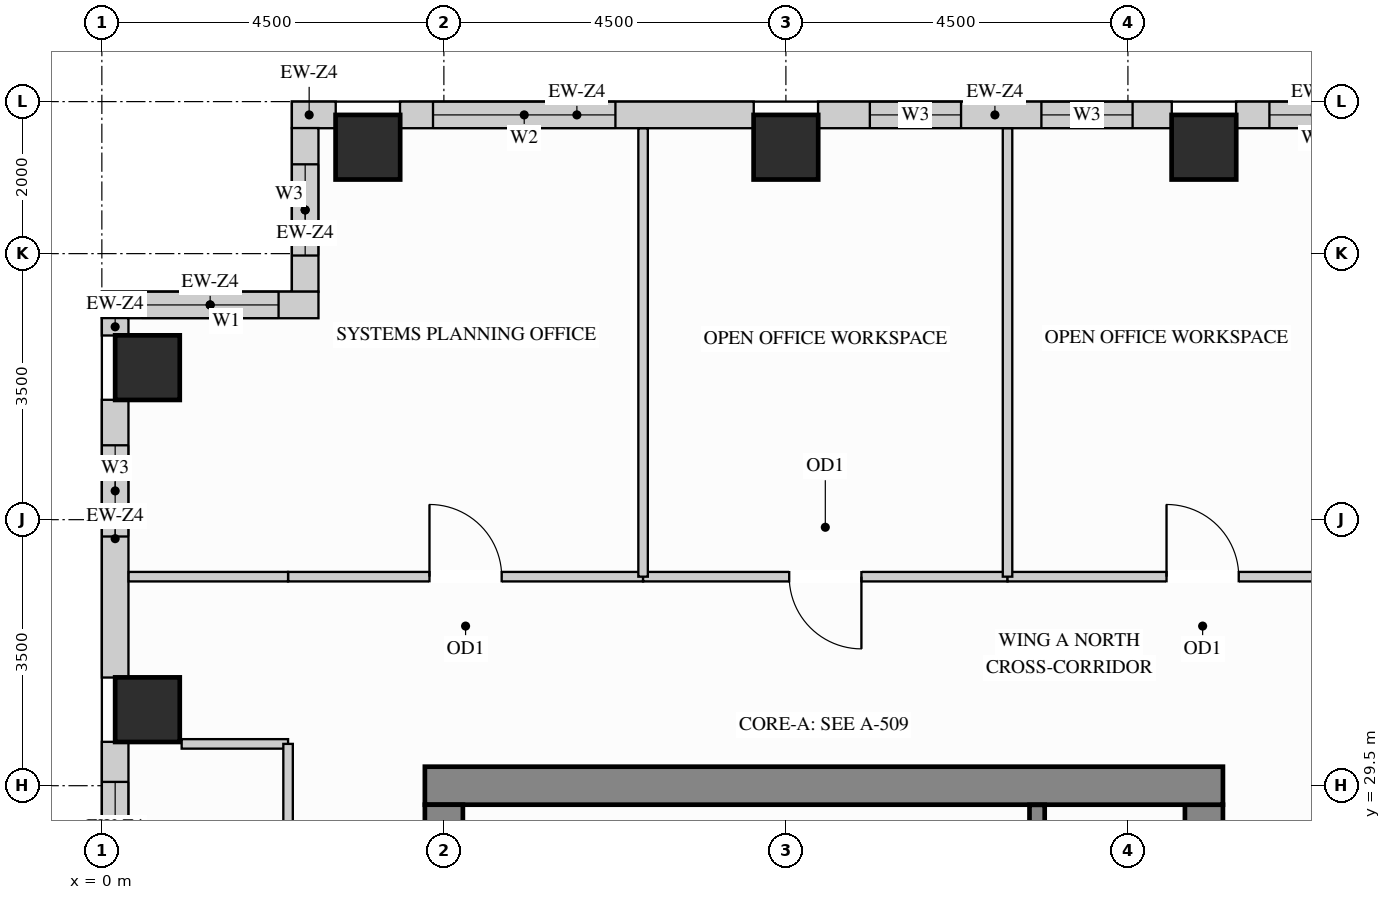
"""IFC4 building model, lengths in metres.
Left out: names, types, materials, properties, quantities, classifications, styles, units other than length and angle.
Written with IfcOpenShell. Run it as: python <this file> out.ifc"""

import sys

from ifc_helpers import new_model, si_unit, direction, frame, frame_2d, origin, origin_2d, place, context, subcontext, project, spatial, rectangle, extrude, source, transform, mapped, element, fill, save


model = new_model("IFC4")
c1 = context("Model", 3, precision=1e-05, world=origin(), true_north=direction((0.0, 1.0)))
c2 = subcontext(c1, "Body", "Model", "MODEL_VIEW")
j1 = project(units=[si_unit("LENGTHUNIT", "METRE"), si_unit("PLANEANGLEUNIT", "RADIAN")], contexts=[c1])
p1 = place(None, origin())
s1 = spatial("IfcSite", under=j1, at=p1, CompositionType="ELEMENT")
p2 = place(p1, origin())
s2 = spatial("IfcBuilding", under=s1, at=p2, CompositionType="ELEMENT")
p3 = place(p2, frame((0.0, 0.0, 216.0)))
s3 = spatial("IfcBuildingStorey", under=s2, at=p3, CompositionType="ELEMENT", Elevation=216.0)
m1 = source(origin(), c2, "Body", "SweptSolid", [
    extrude(rectangle(XDim=0.85, YDim=0.85, at=origin_2d()), origin(), (0.0, 0.0, 1.0), 3.4),
])
for number, where, z_axis, x_axis in (
    (1, (14.5, 37.9, 0.0), (0.0, 0.0, 1.0), (1.0, 0.0, 0.0)),
    (2, (3.5, 37.9, 0.0), (0.0, 0.0, 1.0), (1.0, 0.0, 0.0)),
    (3, (9.0, 37.9, 0.0), (0.0, 0.0, 1.0), (1.0, 0.0, 0.0)),
    (4, (0.6, 30.5, 0.0), (0.0, 0.0, 1.0), (1.0, 0.0, 0.0)),
    (5, (0.6, 35.0, 0.0), (0.0, 0.0, 1.0), (1.0, 0.0, 0.0)),
):
    element("IfcColumn", number, at=place(p3, frame(where, z_axis=z_axis, x_axis=x_axis)), inside=s3, PredefinedType="COLUMN", context=c2, shape_type="MappedRepresentation", body=[
        mapped(m1, transform((0.0, 0.0, 0.0), x_axis=(1.0, 0.0, 0.0), y_axis=(0.0, 1.0, 0.0), z_axis=(0.0, 0.0, 1.0))),
    ])
m2 = source(origin(), c2, "Body", "SweptSolid", [
    extrude(rectangle(XDim=8.37, YDim=0.5, at=frame_2d((4.185, 0.0))), origin(), (0.0, 0.0, 1.0), 3.4),
])
p4 = place(p3, frame((14.5, 20.88, 0.0), z_axis=(0.0, 0.0, 1.0), x_axis=(0.0, 1.0, 0.0)))
e6 = element("IfcWall", 6, at=p4, inside=s3, PredefinedType="SHEAR", context=c2, shape_type="MappedRepresentation", body=[
    mapped(m2, transform((0.0, 0.0, 0.0), x_axis=(1.0, 0.0, 0.0), y_axis=(0.0, 1.0, 0.0), z_axis=(0.0, 0.0, 1.0))),
])
m3 = source(origin(), c2, "Body", "SweptSolid", [
    extrude(rectangle(XDim=10.5, YDim=0.5, at=frame_2d((5.25, 0.0))), origin(), (0.0, 0.0, 1.0), 3.4),
])
p5 = place(p3, frame((4.25, 29.5, 0.0), z_axis=(0.0, 0.0, 1.0), x_axis=(1.0, 0.0, 0.0)))
e7 = element("IfcWall", 7, at=p5, inside=s3, PredefinedType="SHEAR", context=c2, shape_type="MappedRepresentation", body=[
    mapped(m3, transform((0.0, 0.0, 0.0), x_axis=(1.0, 0.0, 0.0), y_axis=(0.0, 1.0, 0.0), z_axis=(0.0, 0.0, 1.0))),
])
m4 = source(origin(), c2, "Body", "SweptSolid", [
    extrude(rectangle(XDim=20.5, YDim=0.5, at=frame_2d((10.25, 0.0))), origin(), (0.0, 0.0, 1.0), 3.4),
])
p6 = place(p3, frame((4.5, 8.75, 0.0), z_axis=(0.0, 0.0, 1.0), x_axis=(0.0, 1.0, 0.0)))
e8 = element("IfcWall", 8, at=p6, inside=s3, PredefinedType="SHEAR", context=c2, shape_type="MappedRepresentation", body=[
    mapped(m4, transform((0.0, 0.0, 0.0), x_axis=(1.0, 0.0, 0.0), y_axis=(0.0, 1.0, 0.0), z_axis=(0.0, 0.0, 1.0))),
])
p7 = place(p3, frame((17.0, 38.325, 0.0), z_axis=(0.0, 0.0, 1.0), x_axis=(-1.0, 0.0, 0.0)))
e9 = element("IfcWall", 9, at=p7, inside=s3, PredefinedType="SOLIDWALL", context=c2, shape_type="SweptSolid", body=[
    extrude(rectangle(XDim=2.077, YDim=0.35, at=frame_2d((1.039, 0.0))), origin(), (0.0, 0.0, 1.0), 3.385),
])
p8 = place(p7, frame((0.438, 0.0, 0.78)))
e10 = element("IfcOpeningElement", 10, at=p8, cuts=e9, PredefinedType="OPENING", context=c2, shape_type="SweptSolid", body=[
    extrude(rectangle(XDim=1.2, YDim=2.1, at=frame_2d((0.6, 1.05))), frame((0.0, 0.185, 0.0), z_axis=(0.0, -1.0, 0.0), x_axis=(1.0, 0.0, 0.0)), (0.0, 0.0, 1.0), 0.37),
])
p9 = place(p3, frame((14.077, 38.325, 0.0), z_axis=(0.0, 0.0, 1.0), x_axis=(-1.0, 0.0, 0.0)))
e11 = element("IfcWall", 11, at=p9, inside=s3, PredefinedType="SOLIDWALL", context=c2, shape_type="SweptSolid", body=[
    extrude(rectangle(XDim=4.654, YDim=0.35, at=frame_2d((2.327, 0.0))), origin(), (0.0, 0.0, 1.0), 3.385),
])
p10 = place(p9, frame((0.515, 0.0, 0.78)))
e12 = element("IfcOpeningElement", 12, at=p10, cuts=e11, PredefinedType="OPENING", context=c2, shape_type="SweptSolid", body=[
    extrude(rectangle(XDim=1.2, YDim=2.1, at=frame_2d((0.6, 1.05))), frame((0.0, 0.185, 0.0), z_axis=(0.0, -1.0, 0.0), x_axis=(1.0, 0.0, 0.0)), (0.0, 0.0, 1.0), 0.37),
])
p11 = place(p9, frame((2.772, 0.0, 0.78)))
e13 = element("IfcOpeningElement", 13, at=p11, cuts=e11, PredefinedType="OPENING", context=c2, shape_type="SweptSolid", body=[
    extrude(rectangle(XDim=1.2, YDim=2.1, at=frame_2d((0.6, 1.05))), frame((0.0, 0.185, 0.0), z_axis=(0.0, -1.0, 0.0), x_axis=(1.0, 0.0, 0.0)), (0.0, 0.0, 1.0), 0.37),
])
p12 = place(p3, frame((8.577, 38.325, 0.0), z_axis=(0.0, 0.0, 1.0), x_axis=(-1.0, 0.0, 0.0)))
e14 = element("IfcWall", 14, at=p12, inside=s3, PredefinedType="SOLIDWALL", context=c2, shape_type="SweptSolid", body=[
    extrude(rectangle(XDim=4.654, YDim=0.35, at=frame_2d((2.327, 0.0))), origin(), (0.0, 0.0, 1.0), 3.385),
])
p13 = place(p12, frame((1.82, 0.0, 0.78)))
e15 = element("IfcOpeningElement", 15, at=p13, cuts=e14, PredefinedType="OPENING", context=c2, shape_type="SweptSolid", body=[
    extrude(rectangle(XDim=2.4, YDim=2.1, at=frame_2d((1.2, 1.05))), frame((0.0, 0.185, 0.0), z_axis=(0.0, -1.0, 0.0), x_axis=(1.0, 0.0, 0.0)), (0.0, 0.0, 1.0), 0.37),
])
m5 = source(origin(), c2, "Body", "SweptSolid", [
    extrude(rectangle(XDim=0.577, YDim=0.35, at=frame_2d((0.289, 0.0))), origin(), (0.0, 0.0, 1.0), 3.385),
])
p14 = place(p3, frame((3.077, 38.325, 0.0), z_axis=(0.0, 0.0, 1.0), x_axis=(-1.0, 0.0, 0.0)))
e16 = element("IfcWall", 16, at=p14, inside=s3, PredefinedType="SOLIDWALL", context=c2, shape_type="MappedRepresentation", body=[
    mapped(m5, transform((0.0, 0.0, 0.0), x_axis=(1.0, 0.0, 0.0), y_axis=(0.0, 1.0, 0.0), z_axis=(0.0, 0.0, 1.0))),
])
p15 = place(p3, frame((2.675, 38.152, 0.0), z_axis=(0.0, 0.0, 1.0), x_axis=(0.0, -1.0, 0.0)))
e17 = element("IfcWall", 17, at=p15, inside=s3, PredefinedType="SOLIDWALL", context=c2, shape_type="SweptSolid", body=[
    extrude(rectangle(XDim=2.154, YDim=0.35, at=frame_2d((1.077, 0.0))), origin(), (0.0, 0.0, 1.0), 3.385),
])
p16 = place(p15, frame((0.477, 0.0, 0.78)))
e18 = element("IfcOpeningElement", 18, at=p16, cuts=e17, PredefinedType="OPENING", context=c2, shape_type="SweptSolid", body=[
    extrude(rectangle(XDim=1.2, YDim=2.1, at=frame_2d((0.6, 1.05))), frame((0.0, 0.185, 0.0), z_axis=(0.0, -1.0, 0.0), x_axis=(1.0, 0.0, 0.0)), (0.0, 0.0, 1.0), 0.37),
])
p17 = place(p3, frame((2.85, 35.825, 0.0), z_axis=(0.0, 0.0, 1.0), x_axis=(-1.0, 0.0, 0.0)))
e19 = element("IfcWall", 19, at=p17, inside=s3, PredefinedType="SOLIDWALL", context=c2, shape_type="SweptSolid", body=[
    extrude(rectangle(XDim=2.85, YDim=0.35, at=frame_2d((1.425, 0.0))), origin(), (0.0, 0.0, 1.0), 3.385),
])
p18 = place(p17, frame((0.525, 0.0, 0.78)))
e20 = element("IfcOpeningElement", 20, at=p18, cuts=e19, PredefinedType="OPENING", context=c2, shape_type="SweptSolid", body=[
    extrude(rectangle(XDim=1.8, YDim=2.1, at=frame_2d((0.9, 1.05))), frame((0.0, 0.185, 0.0), z_axis=(0.0, -1.0, 0.0), x_axis=(1.0, 0.0, 0.0)), (0.0, 0.0, 1.0), 0.37),
])
m6 = source(origin(), c2, "Body", "SweptSolid", [
    extrude(rectangle(XDim=0.229, YDim=0.35, at=frame_2d((0.115, 0.0))), origin(), (0.0, 0.0, 1.0), 3.385),
])
p19 = place(p3, frame((0.175, 35.652, 0.0), z_axis=(0.0, 0.0, 1.0), x_axis=(0.0, -1.0, 0.0)))
e21 = element("IfcWall", 21, at=p19, inside=s3, PredefinedType="SOLIDWALL", context=c2, shape_type="MappedRepresentation", body=[
    mapped(m6, transform((0.0, 0.0, 0.0), x_axis=(1.0, 0.0, 0.0), y_axis=(0.0, 1.0, 0.0), z_axis=(0.0, 0.0, 1.0))),
])
p20 = place(p3, frame((0.175, 34.577, 0.0), z_axis=(0.0, 0.0, 1.0), x_axis=(0.0, -1.0, 0.0)))
e22 = element("IfcWall", 22, at=p20, inside=s3, PredefinedType="SOLIDWALL", context=c2, shape_type="SweptSolid", body=[
    extrude(rectangle(XDim=3.654, YDim=0.35, at=frame_2d((1.827, 0.0))), origin(), (0.0, 0.0, 1.0), 3.385),
])
p21 = place(p20, frame((0.598, 0.0, 0.78)))
e23 = element("IfcOpeningElement", 23, at=p21, cuts=e22, PredefinedType="OPENING", context=c2, shape_type="SweptSolid", body=[
    extrude(rectangle(XDim=1.2, YDim=2.1, at=frame_2d((0.6, 1.05))), frame((0.0, 0.185, 0.0), z_axis=(0.0, -1.0, 0.0), x_axis=(1.0, 0.0, 0.0)), (0.0, 0.0, 1.0), 0.37),
])
p22 = place(p3, frame((0.175, 30.077, 0.0), z_axis=(0.0, 0.0, 1.0), x_axis=(0.0, -1.0, 0.0)))
e24 = element("IfcWall", 24, at=p22, inside=s3, PredefinedType="SOLIDWALL", context=c2, shape_type="SweptSolid", body=[
    extrude(rectangle(XDim=2.854, YDim=0.35, at=frame_2d((1.427, 0.0))), origin(), (0.0, 0.0, 1.0), 3.385),
])
p23 = place(p22, frame((0.527, 0.0, 0.78)))
e25 = element("IfcOpeningElement", 25, at=p23, cuts=e24, PredefinedType="OPENING", context=c2, shape_type="SweptSolid", body=[
    extrude(rectangle(XDim=1.8, YDim=2.1, at=frame_2d((0.9, 1.05))), frame((0.0, 0.185, 0.0), z_axis=(0.0, -1.0, 0.0), x_axis=(1.0, 0.0, 0.0)), (0.0, 0.0, 1.0), 0.37),
])
p24 = place(p3, frame((2.45, 32.25, 0.0), z_axis=(0.0, 0.0, 1.0), x_axis=(1.0, 0.0, 0.0)))
e26 = element("IfcWall", 26, at=p24, inside=s3, PredefinedType="PARTITIONING", context=c2, shape_type="SweptSolid", body=[
    extrude(rectangle(XDim=4.671, YDim=0.125, at=frame_2d((2.335, 0.0))), origin(), (0.0, 0.0, 1.0), 3.385),
])
p25 = place(p24, frame((1.861, 0.0, 0.0)))
e27 = element("IfcOpeningElement", 27, at=p25, cuts=e26, PredefinedType="OPENING", context=c2, shape_type="SweptSolid", body=[
    extrude(rectangle(XDim=0.95, YDim=2.15, at=frame_2d((0.475, 1.075))), frame((0.0, 0.073, 0.0), z_axis=(0.0, -1.0, 0.0), x_axis=(1.0, 0.0, 0.0)), (0.0, 0.0, 1.0), 0.145),
])
p26 = place(p3, frame((7.121, 32.25, 0.0), z_axis=(0.0, 0.0, 1.0), x_axis=(1.0, 0.0, 0.0)))
e28 = element("IfcWall", 28, at=p26, inside=s3, PredefinedType="PARTITIONING", context=c2, shape_type="SweptSolid", body=[
    extrude(rectangle(XDim=4.795, YDim=0.125, at=frame_2d((2.397, 0.0))), origin(), (0.0, 0.0, 1.0), 3.385),
])
p27 = place(p26, frame((1.923, 0.0, 0.0)))
e29 = element("IfcOpeningElement", 29, at=p27, cuts=e28, PredefinedType="OPENING", context=c2, shape_type="SweptSolid", body=[
    extrude(rectangle(XDim=0.95, YDim=2.15, at=frame_2d((0.475, 1.075))), frame((0.0, 0.073, 0.0), z_axis=(0.0, -1.0, 0.0), x_axis=(1.0, 0.0, 0.0)), (0.0, 0.0, 1.0), 0.145),
])
p28 = place(p3, frame((11.916, 32.25, 0.0), z_axis=(0.0, 0.0, 1.0), x_axis=(1.0, 0.0, 0.0)))
e30 = element("IfcWall", 30, at=p28, inside=s3, PredefinedType="PARTITIONING", context=c2, shape_type="SweptSolid", body=[
    extrude(rectangle(XDim=5.134, YDim=0.125, at=frame_2d((2.567, 0.0))), origin(), (0.0, 0.0, 1.0), 3.385),
])
p29 = place(p28, frame((2.092, 0.0, 0.0)))
e31 = element("IfcOpeningElement", 31, at=p29, cuts=e30, PredefinedType="OPENING", context=c2, shape_type="SweptSolid", body=[
    extrude(rectangle(XDim=0.95, YDim=2.15, at=frame_2d((0.475, 1.075))), frame((0.0, 0.073, 0.0), z_axis=(0.0, -1.0, 0.0), x_axis=(1.0, 0.0, 0.0)), (0.0, 0.0, 1.0), 0.145),
])
m7 = source(origin(), c2, "Body", "SweptSolid", [
    extrude(rectangle(XDim=2.098, YDim=0.125, at=frame_2d((1.049, 0.0))), origin(), (0.0, 0.0, 1.0), 3.385),
])
p30 = place(p3, frame((0.352, 32.25, 0.0), z_axis=(0.0, 0.0, 1.0), x_axis=(1.0, 0.0, 0.0)))
e32 = element("IfcWall", 32, at=p30, inside=s3, PredefinedType="PARTITIONING", context=c2, shape_type="MappedRepresentation", body=[
    mapped(m7, transform((0.0, 0.0, 0.0), x_axis=(1.0, 0.0, 0.0), y_axis=(0.0, 1.0, 0.0), z_axis=(0.0, 0.0, 1.0))),
])
m8 = source(origin(), c2, "Body", "SweptSolid", [
    extrude(rectangle(XDim=5.898, YDim=0.125, at=frame_2d((2.949, 0.0))), origin(), (0.0, 0.0, 1.0), 3.385),
])
for number, where, z_axis, x_axis in (
    (33, (7.121, 32.25, 0.0), (0.0, 0.0, 1.0), (0.0, 1.0, 0.0)),
    (34, (11.916, 32.25, 0.0), (0.0, 0.0, 1.0), (0.0, 1.0, 0.0)),
):
    element("IfcWall", number, at=place(p3, frame(where, z_axis=z_axis, x_axis=x_axis)), inside=s3, PredefinedType="PARTITIONING", context=c2, shape_type="MappedRepresentation", body=[
        mapped(m8, transform((0.0, 0.0, 0.0), x_axis=(1.0, 0.0, 0.0), y_axis=(0.0, 1.0, 0.0), z_axis=(0.0, 0.0, 1.0))),
    ])
m9 = source(origin(), c2, "Body", "SweptSolid", [
    extrude(rectangle(XDim=1.4, YDim=0.125, at=frame_2d((0.7, 0.0))), origin(), (0.0, 0.0, 1.0), 3.385),
])
p31 = place(p3, frame((1.05, 30.05, 0.0), z_axis=(0.0, 0.0, 1.0), x_axis=(1.0, 0.0, 0.0)))
e35 = element("IfcWall", 35, at=p31, inside=s3, PredefinedType="PARTITIONING", context=c2, shape_type="MappedRepresentation", body=[
    mapped(m9, transform((0.0, 0.0, 0.0), x_axis=(1.0, 0.0, 0.0), y_axis=(0.0, 1.0, 0.0), z_axis=(0.0, 0.0, 1.0))),
])
p32 = place(p3, frame((2.45, 22.6, 0.0), z_axis=(0.0, 0.0, 1.0), x_axis=(0.0, 1.0, 0.0)))
e36 = element("IfcWall", 36, at=p32, inside=s3, PredefinedType="PARTITIONING", context=c2, shape_type="SweptSolid", body=[
    extrude(rectangle(XDim=7.45, YDim=0.125, at=frame_2d((3.725, 0.0))), origin(), (0.0, 0.0, 1.0), 3.385),
])
p33 = place(p32, frame((3.25, 0.0, 0.0)))
e37 = element("IfcOpeningElement", 37, at=p33, cuts=e36, PredefinedType="OPENING", context=c2, shape_type="SweptSolid", body=[
    extrude(rectangle(XDim=0.95, YDim=2.15, at=frame_2d((0.475, 1.075))), frame((0.0, 0.073, 0.0), z_axis=(0.0, -1.0, 0.0), x_axis=(1.0, 0.0, 0.0)), (0.0, 0.0, 1.0), 0.145),
])
m10 = source(origin(), c2, "Body", "SweptSolid", [
    extrude(rectangle(XDim=3.803, YDim=0.2, at=frame_2d((1.901, 0.0))), origin(), (0.0, 0.0, 1.0), 3.4),
])
p34 = place(p3, frame((12.305, 25.445, 0.0), z_axis=(0.0, 0.0, 1.0), x_axis=(0.0, 1.0, 0.0)))
e38 = element("IfcWall", 38, at=p34, inside=s3, PredefinedType="SHEAR", context=c2, shape_type="MappedRepresentation", body=[
    mapped(m10, transform((0.0, 0.0, 0.0), x_axis=(1.0, 0.0, 0.0), y_axis=(0.0, 1.0, 0.0), z_axis=(0.0, 0.0, 1.0))),
])
m11 = source(origin(), c2, "Body", "SweptSolid", [
    extrude(rectangle(XDim=0.95, YDim=2.15, at=frame_2d((0.475, 1.075))), frame((0.0, 0.025, 0.0), z_axis=(0.0, -1.0, 0.0), x_axis=(1.0, 0.0, 0.0)), (0.0, 0.0, 1.0), 0.05),
])
p35 = place(p25, origin())
e39 = element("IfcDoor", 39, at=p35, inside=s3, OperationType="SINGLE_SWING_LEFT", PredefinedType="DOOR", context=c2, shape_type="MappedRepresentation", body=[
    mapped(m11, transform((0.0, 0.0, 0.0), x_axis=(1.0, 0.0, 0.0), y_axis=(0.0, 1.0, 0.0), z_axis=(0.0, 0.0, 1.0))),
])
fill(e27, e39)
p36 = place(p27, origin())
e40 = element("IfcDoor", 40, at=p36, inside=s3, OperationType="SINGLE_SWING_RIGHT", PredefinedType="DOOR", context=c2, shape_type="MappedRepresentation", body=[
    mapped(m11, transform((0.0, 0.0, 0.0), x_axis=(1.0, 0.0, 0.0), y_axis=(0.0, 1.0, 0.0), z_axis=(0.0, 0.0, 1.0))),
])
fill(e29, e40)
p37 = place(p29, origin())
e41 = element("IfcDoor", 41, at=p37, inside=s3, OperationType="SINGLE_SWING_LEFT", PredefinedType="DOOR", context=c2, shape_type="MappedRepresentation", body=[
    mapped(m11, transform((0.0, 0.0, 0.0), x_axis=(1.0, 0.0, 0.0), y_axis=(0.0, 1.0, 0.0), z_axis=(0.0, 0.0, 1.0))),
])
fill(e31, e41)
m12 = source(origin(), c2, "Body", "SweptSolid", [
    extrude(rectangle(XDim=1.8, YDim=2.1, at=frame_2d((0.9, 1.05))), frame((0.0, 0.03, 0.0), z_axis=(0.0, -1.0, 0.0), x_axis=(1.0, 0.0, 0.0)), (0.0, 0.0, 1.0), 0.06),
])
p38 = place(p18, origin())
e42 = element("IfcWindow", 42, at=p38, inside=s3, PartitioningType="SINGLE_PANEL", PredefinedType="WINDOW", context=c2, shape_type="MappedRepresentation", body=[
    mapped(m12, transform((0.0, 0.0, 0.0), x_axis=(1.0, 0.0, 0.0), y_axis=(0.0, 1.0, 0.0), z_axis=(0.0, 0.0, 1.0))),
])
fill(e20, e42)
p39 = place(p23, origin())
e43 = element("IfcWindow", 43, at=p39, inside=s3, PartitioningType="SINGLE_PANEL", PredefinedType="WINDOW", context=c2, shape_type="MappedRepresentation", body=[
    mapped(m12, transform((0.0, 0.0, 0.0), x_axis=(1.0, 0.0, 0.0), y_axis=(0.0, 1.0, 0.0), z_axis=(0.0, 0.0, 1.0))),
])
fill(e25, e43)
m13 = source(origin(), c2, "Body", "SweptSolid", [
    extrude(rectangle(XDim=2.4, YDim=2.1, at=frame_2d((1.2, 1.05))), frame((0.0, 0.03, 0.0), z_axis=(0.0, -1.0, 0.0), x_axis=(1.0, 0.0, 0.0)), (0.0, 0.0, 1.0), 0.06),
])
p40 = place(p13, origin())
e44 = element("IfcWindow", 44, at=p40, inside=s3, PartitioningType="SINGLE_PANEL", PredefinedType="WINDOW", context=c2, shape_type="MappedRepresentation", body=[
    mapped(m13, transform((0.0, 0.0, 0.0), x_axis=(1.0, 0.0, 0.0), y_axis=(0.0, 1.0, 0.0), z_axis=(0.0, 0.0, 1.0))),
])
fill(e15, e44)
m14 = source(origin(), c2, "Body", "SweptSolid", [
    extrude(rectangle(XDim=1.2, YDim=2.1, at=frame_2d((0.6, 1.05))), frame((0.0, 0.03, 0.0), z_axis=(0.0, -1.0, 0.0), x_axis=(1.0, 0.0, 0.0)), (0.0, 0.0, 1.0), 0.06),
])
p41 = place(p8, origin())
e45 = element("IfcWindow", 45, at=p41, inside=s3, PartitioningType="SINGLE_PANEL", PredefinedType="WINDOW", context=c2, shape_type="MappedRepresentation", body=[
    mapped(m14, transform((0.0, 0.0, 0.0), x_axis=(1.0, 0.0, 0.0), y_axis=(0.0, 1.0, 0.0), z_axis=(0.0, 0.0, 1.0))),
])
fill(e10, e45)
p42 = place(p10, origin())
e46 = element("IfcWindow", 46, at=p42, inside=s3, PartitioningType="SINGLE_PANEL", PredefinedType="WINDOW", context=c2, shape_type="MappedRepresentation", body=[
    mapped(m14, transform((0.0, 0.0, 0.0), x_axis=(1.0, 0.0, 0.0), y_axis=(0.0, 1.0, 0.0), z_axis=(0.0, 0.0, 1.0))),
])
fill(e12, e46)
p43 = place(p11, origin())
e47 = element("IfcWindow", 47, at=p43, inside=s3, PartitioningType="SINGLE_PANEL", PredefinedType="WINDOW", context=c2, shape_type="MappedRepresentation", body=[
    mapped(m14, transform((0.0, 0.0, 0.0), x_axis=(1.0, 0.0, 0.0), y_axis=(0.0, 1.0, 0.0), z_axis=(0.0, 0.0, 1.0))),
])
fill(e13, e47)
p44 = place(p16, origin())
e48 = element("IfcWindow", 48, at=p44, inside=s3, PartitioningType="SINGLE_PANEL", PredefinedType="WINDOW", context=c2, shape_type="MappedRepresentation", body=[
    mapped(m14, transform((0.0, 0.0, 0.0), x_axis=(1.0, 0.0, 0.0), y_axis=(0.0, 1.0, 0.0), z_axis=(0.0, 0.0, 1.0))),
])
fill(e18, e48)
p45 = place(p21, origin())
e49 = element("IfcWindow", 49, at=p45, inside=s3, PartitioningType="SINGLE_PANEL", PredefinedType="WINDOW", context=c2, shape_type="MappedRepresentation", body=[
    mapped(m14, transform((0.0, 0.0, 0.0), x_axis=(1.0, 0.0, 0.0), y_axis=(0.0, 1.0, 0.0), z_axis=(0.0, 0.0, 1.0))),
])
fill(e23, e49)
save(model, sys.argv[1])
